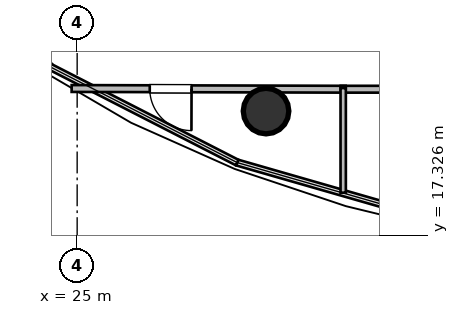
"""IFC4 building model, lengths in metres.
Left out: names, types, materials, properties, quantities, classifications, styles, units other than length and angle.
Written with IfcOpenShell. Run it as: python <this file> out.ifc"""

import sys

from ifc_helpers import new_model, si_unit, direction, frame, frame_2d, origin, origin_2d, place, context, subcontext, project, spatial, rectangle, circle, extrude, element, fill, save


model = new_model("IFC4")
c1 = context("Model", 3, precision=1e-05, world=origin(), true_north=direction((0.0, 1.0)))
c2 = subcontext(c1, "Body", "Model", "MODEL_VIEW")
j1 = project(units=[si_unit("LENGTHUNIT", "METRE"), si_unit("PLANEANGLEUNIT", "RADIAN")], contexts=[c1])
p1 = place(None, origin())
s1 = spatial("IfcSite", under=j1, at=p1, CompositionType="ELEMENT")
p2 = place(p1, origin())
s2 = spatial("IfcBuilding", under=s1, at=p2, CompositionType="ELEMENT")
p3 = place(p2, frame((0.0, 0.0, 113.4)))
s3 = spatial("IfcBuildingStorey", under=s2, at=p3, CompositionType="ELEMENT", Elevation=113.4)
p4 = place(p3, frame((29.97, 20.6, 0.0), z_axis=(0.0, 0.0, 1.0), x_axis=(1.0, 0.0, 0.0)))
e1 = element("IfcColumn", 1, at=p4, inside=s3, PredefinedType="COLUMN", context=c2, shape_type="SweptSolid", body=[
    extrude(circle(Radius=0.6, at=origin_2d()), origin(), (0.0, 0.0, 1.0), 3.6),
])
p5 = place(p3, frame((32.065, 21.175, 0.0), z_axis=(0.0, 0.0, 1.0), x_axis=(-0.999996512042, 0.002641193551, 0.0)))
e2 = element("IfcWall", 2, at=p5, inside=s3, PredefinedType="PARTITIONING", context=c2, shape_type="SweptSolid", body=[
    extrude(rectangle(XDim=7.21, YDim=0.18, at=frame_2d((3.605, 0.0))), origin(), (0.0, 0.0, 1.0), 2.657),
])
p6 = place(p5, frame((4.055, 0.0, 0.0)))
e3 = element("IfcOpeningElement", 3, at=p6, cuts=e2, PredefinedType="OPENING", context=c2, shape_type="SweptSolid", body=[
    extrude(rectangle(XDim=1.1, YDim=2.1, at=frame_2d((0.55, 1.05))), frame((0.0, 0.1, 0.0), z_axis=(0.0, -1.0, 0.0), x_axis=(1.0, 0.0, 0.0)), (0.0, 0.0, 1.0), 0.2),
])
p7 = place(p3, frame((46.455, 21.175, 0.0), z_axis=(0.0, 0.0, 1.0), x_axis=(-1.0, 0.0, 0.0)))
e4 = element("IfcWall", 4, at=p7, inside=s3, PredefinedType="PARTITIONING", context=c2, shape_type="SweptSolid", body=[
    extrude(rectangle(XDim=14.52, YDim=0.18, at=frame_2d((7.26, 0.0))), origin(), (0.0, 0.0, 1.0), 2.996),
])
p8 = place(p7, frame((6.71, 0.0, 0.0)))
e5 = element("IfcOpeningElement", 5, at=p8, cuts=e4, PredefinedType="OPENING", context=c2, shape_type="SweptSolid", body=[
    extrude(rectangle(XDim=1.1, YDim=2.1, at=frame_2d((0.55, 1.05))), frame((0.0, 0.1, 0.0), z_axis=(0.0, -1.0, 0.0), x_axis=(1.0, 0.0, 0.0)), (0.0, 0.0, 1.0), 0.2),
])
p9 = place(p3, frame((32.0, 21.205, 0.0), z_axis=(0.0, 0.0, 1.0), x_axis=(0.0, -1.0, 0.0)))
e6 = element("IfcWall", 6, at=p9, inside=s3, PredefinedType="PARTITIONING", context=c2, shape_type="SweptSolid", body=[
    extrude(rectangle(XDim=2.752, YDim=0.14, at=frame_2d((1.376, 0.0))), origin(), (0.0, 0.0, 1.0), 3.36),
])
p10 = place(p6, origin())
e7 = element("IfcDoor", 7, at=p10, inside=s3, OperationType="SINGLE_SWING_LEFT", PredefinedType="DOOR", context=c2, shape_type="SweptSolid", body=[
    extrude(rectangle(XDim=1.1, YDim=2.1, at=frame_2d((0.55, 1.05))), frame((0.0, 0.025, 0.0), z_axis=(0.0, -1.0, 0.0), x_axis=(1.0, 0.0, 0.0)), (0.0, 0.0, 1.0), 0.05),
])
fill(e3, e7)
save(model, sys.argv[1])
